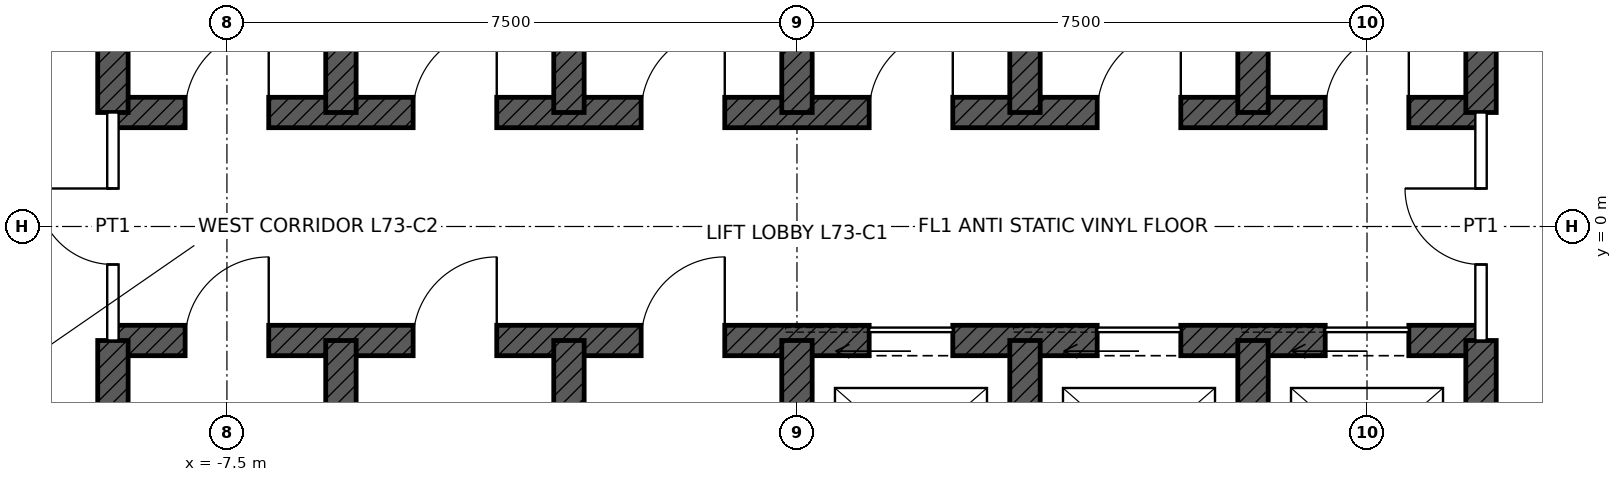
"""IFC4 building model, lengths in metres.
Left out: names, types, materials, properties, quantities, classifications, styles, units other than length and angle.
Written with IfcOpenShell. Run it as: python <this file> out.ifc"""

import sys

from ifc_helpers import new_model, si_unit, direction, frame, frame_2d, origin, place, context, subcontext, project, spatial, rectangle, extrude, element, fill, save


model = new_model("IFC4")
c1 = context("Model", 3, precision=1e-05, world=origin(), true_north=direction((0.0, 1.0)))
c2 = subcontext(c1, "Body", "Model", "MODEL_VIEW")
j1 = project(units=[si_unit("LENGTHUNIT", "METRE"), si_unit("PLANEANGLEUNIT", "RADIAN")], contexts=[c1])
p1 = place(None, origin())
s1 = spatial("IfcSite", under=j1, at=p1, CompositionType="ELEMENT")
p2 = place(p1, origin())
s2 = spatial("IfcBuilding", under=s1, at=p2, CompositionType="ELEMENT")
p3 = place(p2, frame((0.0, 0.0, 327.9)))
s3 = spatial("IfcBuildingStorey", under=s2, at=p3, CompositionType="ELEMENT", Elevation=327.9)
p4 = place(p3, frame((-9.0, 1.5, 0.0), z_axis=(0.0, 0.0, 1.0), x_axis=(1.0, 0.0, 0.0)))
e1 = element("IfcWall", 1, at=p4, inside=s3, PredefinedType="SHEAR", context=c2, shape_type="SweptSolid", body=[
    extrude(rectangle(XDim=18.0, YDim=0.4, at=frame_2d((9.0, 0.0))), origin(), (0.0, 0.0, 1.0), 4.0),
])
p5 = place(p4, frame((0.95, 0.0, 0.0)))
e2 = element("IfcOpeningElement", 2, at=p5, cuts=e1, PredefinedType="OPENING", context=c2, shape_type="SweptSolid", body=[
    extrude(rectangle(XDim=1.1, YDim=2.1, at=frame_2d((0.55, 1.05))), frame((0.0, 0.21, 0.0), z_axis=(0.0, -1.0, 0.0), x_axis=(1.0, 0.0, 0.0)), (0.0, 0.0, 1.0), 0.42),
])
p6 = place(p4, frame((3.95, 0.0, 0.0)))
e3 = element("IfcOpeningElement", 3, at=p6, cuts=e1, PredefinedType="OPENING", context=c2, shape_type="SweptSolid", body=[
    extrude(rectangle(XDim=1.1, YDim=2.1, at=frame_2d((0.55, 1.05))), frame((0.0, 0.21, 0.0), z_axis=(0.0, -1.0, 0.0), x_axis=(1.0, 0.0, 0.0)), (0.0, 0.0, 1.0), 0.42),
])
p7 = place(p4, frame((6.95, 0.0, 0.0)))
e4 = element("IfcOpeningElement", 4, at=p7, cuts=e1, PredefinedType="OPENING", context=c2, shape_type="SweptSolid", body=[
    extrude(rectangle(XDim=1.1, YDim=2.1, at=frame_2d((0.55, 1.05))), frame((0.0, 0.21, 0.0), z_axis=(0.0, -1.0, 0.0), x_axis=(1.0, 0.0, 0.0)), (0.0, 0.0, 1.0), 0.42),
])
p8 = place(p4, frame((9.95, 0.0, 0.0)))
e5 = element("IfcOpeningElement", 5, at=p8, cuts=e1, PredefinedType="OPENING", context=c2, shape_type="SweptSolid", body=[
    extrude(rectangle(XDim=1.1, YDim=2.1, at=frame_2d((0.55, 1.05))), frame((0.0, 0.21, 0.0), z_axis=(0.0, -1.0, 0.0), x_axis=(1.0, 0.0, 0.0)), (0.0, 0.0, 1.0), 0.42),
])
p9 = place(p4, frame((12.95, 0.0, 0.0)))
e6 = element("IfcOpeningElement", 6, at=p9, cuts=e1, PredefinedType="OPENING", context=c2, shape_type="SweptSolid", body=[
    extrude(rectangle(XDim=1.1, YDim=2.1, at=frame_2d((0.55, 1.05))), frame((0.0, 0.21, 0.0), z_axis=(0.0, -1.0, 0.0), x_axis=(1.0, 0.0, 0.0)), (0.0, 0.0, 1.0), 0.42),
])
p10 = place(p4, frame((15.95, 0.0, 0.0)))
e7 = element("IfcOpeningElement", 7, at=p10, cuts=e1, PredefinedType="OPENING", context=c2, shape_type="SweptSolid", body=[
    extrude(rectangle(XDim=1.1, YDim=2.1, at=frame_2d((0.55, 1.05))), frame((0.0, 0.21, 0.0), z_axis=(0.0, -1.0, 0.0), x_axis=(1.0, 0.0, 0.0)), (0.0, 0.0, 1.0), 0.42),
])
p11 = place(p3, frame((-9.0, -1.5, 0.0), z_axis=(0.0, 0.0, 1.0), x_axis=(1.0, 0.0, 0.0)))
e8 = element("IfcWall", 8, at=p11, inside=s3, PredefinedType="SHEAR", context=c2, shape_type="SweptSolid", body=[
    extrude(rectangle(XDim=18.0, YDim=0.4, at=frame_2d((9.0, 0.0))), origin(), (0.0, 0.0, 1.0), 4.0),
])
p12 = place(p11, frame((9.95, 0.0, 0.0)))
e9 = element("IfcOpeningElement", 9, at=p12, cuts=e8, PredefinedType="OPENING", context=c2, shape_type="SweptSolid", body=[
    extrude(rectangle(XDim=1.1, YDim=2.1, at=frame_2d((0.55, 1.05))), frame((0.0, 0.21, 0.0), z_axis=(0.0, -1.0, 0.0), x_axis=(1.0, 0.0, 0.0)), (0.0, 0.0, 1.0), 0.42),
])
p13 = place(p11, frame((12.95, 0.0, 0.0)))
e10 = element("IfcOpeningElement", 10, at=p13, cuts=e8, PredefinedType="OPENING", context=c2, shape_type="SweptSolid", body=[
    extrude(rectangle(XDim=1.1, YDim=2.1, at=frame_2d((0.55, 1.05))), frame((0.0, 0.21, 0.0), z_axis=(0.0, -1.0, 0.0), x_axis=(1.0, 0.0, 0.0)), (0.0, 0.0, 1.0), 0.42),
])
p14 = place(p11, frame((15.95, 0.0, 0.0)))
e11 = element("IfcOpeningElement", 11, at=p14, cuts=e8, PredefinedType="OPENING", context=c2, shape_type="SweptSolid", body=[
    extrude(rectangle(XDim=1.1, YDim=2.1, at=frame_2d((0.55, 1.05))), frame((0.0, 0.21, 0.0), z_axis=(0.0, -1.0, 0.0), x_axis=(1.0, 0.0, 0.0)), (0.0, 0.0, 1.0), 0.42),
])
p15 = place(p11, frame((0.95, 0.0, 0.0)))
e12 = element("IfcOpeningElement", 12, at=p15, cuts=e8, PredefinedType="OPENING", context=c2, shape_type="SweptSolid", body=[
    extrude(rectangle(XDim=1.1, YDim=2.1, at=frame_2d((0.55, 1.05))), frame((0.0, 0.21, 0.0), z_axis=(0.0, -1.0, 0.0), x_axis=(1.0, 0.0, 0.0)), (0.0, 0.0, 1.0), 0.42),
])
p16 = place(p11, frame((3.95, 0.0, 0.0)))
e13 = element("IfcOpeningElement", 13, at=p16, cuts=e8, PredefinedType="OPENING", context=c2, shape_type="SweptSolid", body=[
    extrude(rectangle(XDim=1.1, YDim=2.1, at=frame_2d((0.55, 1.05))), frame((0.0, 0.21, 0.0), z_axis=(0.0, -1.0, 0.0), x_axis=(1.0, 0.0, 0.0)), (0.0, 0.0, 1.0), 0.42),
])
p17 = place(p11, frame((6.95, 0.0, 0.0)))
e14 = element("IfcOpeningElement", 14, at=p17, cuts=e8, PredefinedType="OPENING", context=c2, shape_type="SweptSolid", body=[
    extrude(rectangle(XDim=1.1, YDim=2.1, at=frame_2d((0.55, 1.05))), frame((0.0, 0.21, 0.0), z_axis=(0.0, -1.0, 0.0), x_axis=(1.0, 0.0, 0.0)), (0.0, 0.0, 1.0), 0.42),
])
for number, where, z_axis, x_axis in (
    (15, (-9.0, 1.5, 0.0), (0.0, 0.0, 1.0), (0.0, 1.0, 0.0)),
    (16, (9.0, 1.5, 0.0), (0.0, 0.0, 1.0), (0.0, 1.0, 0.0)),
    (17, (-9.0, -4.5, 0.0), (0.0, 0.0, 1.0), (0.0, 1.0, 0.0)),
    (18, (9.0, -4.5, 0.0), (0.0, 0.0, 1.0), (0.0, 1.0, 0.0)),
    (19, (-6.0, 1.5, 0.0), (0.0, 0.0, 1.0), (0.0, 1.0, 0.0)),
    (20, (-3.0, 1.5, 0.0), (0.0, 0.0, 1.0), (0.0, 1.0, 0.0)),
    (21, (0.0, 1.5, 0.0), (0.0, 0.0, 1.0), (0.0, 1.0, 0.0)),
    (22, (3.0, 1.5, 0.0), (0.0, 0.0, 1.0), (0.0, 1.0, 0.0)),
    (23, (6.0, 1.5, 0.0), (0.0, 0.0, 1.0), (0.0, 1.0, 0.0)),
    (24, (-6.0, -4.5, 0.0), (0.0, 0.0, 1.0), (0.0, 1.0, 0.0)),
    (25, (-3.0, -4.5, 0.0), (0.0, 0.0, 1.0), (0.0, 1.0, 0.0)),
    (26, (0.0, -4.5, 0.0), (0.0, 0.0, 1.0), (0.0, 1.0, 0.0)),
    (27, (3.0, -4.5, 0.0), (0.0, 0.0, 1.0), (0.0, 1.0, 0.0)),
    (28, (6.0, -4.5, 0.0), (0.0, 0.0, 1.0), (0.0, 1.0, 0.0)),
):
    element("IfcWall", number, at=place(p3, frame(where, z_axis=z_axis, x_axis=x_axis)), inside=s3, PredefinedType="SHEAR", context=c2, shape_type="SweptSolid", body=[
        extrude(rectangle(XDim=3.0, YDim=0.4, at=frame_2d((1.5, 0.0))), origin(), (0.0, 0.0, 1.0), 4.0),
    ])
p18 = place(p3, frame((-9.0, -1.5, 0.0), z_axis=(0.0, 0.0, 1.0), x_axis=(0.0, 1.0, 0.0)))
e29 = element("IfcWall", 29, at=p18, inside=s3, PredefinedType="PARTITIONING", context=c2, shape_type="SweptSolid", body=[
    extrude(rectangle(XDim=3.0, YDim=0.15, at=frame_2d((1.5, 0.0))), origin(), (0.0, 0.0, 1.0), 3.75),
])
p19 = place(p18, frame((1.0, 0.0, 0.0)))
e30 = element("IfcOpeningElement", 30, at=p19, cuts=e29, PredefinedType="OPENING", context=c2, shape_type="SweptSolid", body=[
    extrude(rectangle(XDim=1.0, YDim=2.4, at=frame_2d((0.5, 1.2))), frame((0.0, 0.085, 0.0), z_axis=(0.0, -1.0, 0.0), x_axis=(1.0, 0.0, 0.0)), (0.0, 0.0, 1.0), 0.17),
])
p20 = place(p3, frame((9.0, -1.5, 0.0), z_axis=(0.0, 0.0, 1.0), x_axis=(0.0, 1.0, 0.0)))
e31 = element("IfcWall", 31, at=p20, inside=s3, PredefinedType="PARTITIONING", context=c2, shape_type="SweptSolid", body=[
    extrude(rectangle(XDim=3.0, YDim=0.15, at=frame_2d((1.5, 0.0))), origin(), (0.0, 0.0, 1.0), 3.75),
])
p21 = place(p20, frame((1.0, 0.0, 0.0)))
e32 = element("IfcOpeningElement", 32, at=p21, cuts=e31, PredefinedType="OPENING", context=c2, shape_type="SweptSolid", body=[
    extrude(rectangle(XDim=1.0, YDim=2.4, at=frame_2d((0.5, 1.2))), frame((0.0, 0.085, 0.0), z_axis=(0.0, -1.0, 0.0), x_axis=(1.0, 0.0, 0.0)), (0.0, 0.0, 1.0), 0.17),
])
p22 = place(p12, origin())
e33 = element("IfcDoor", 33, at=p22, inside=s3, OperationType="SLIDING_TO_LEFT", PredefinedType="DOOR", context=c2, shape_type="SweptSolid", body=[
    extrude(rectangle(XDim=1.1, YDim=2.1, at=frame_2d((0.55, 1.05))), frame((0.0, 0.025, 0.0), z_axis=(0.0, -1.0, 0.0), x_axis=(1.0, 0.0, 0.0)), (0.0, 0.0, 1.0), 0.05),
])
fill(e9, e33)
p23 = place(p13, origin())
e34 = element("IfcDoor", 34, at=p23, inside=s3, OperationType="SLIDING_TO_LEFT", PredefinedType="DOOR", context=c2, shape_type="SweptSolid", body=[
    extrude(rectangle(XDim=1.1, YDim=2.1, at=frame_2d((0.55, 1.05))), frame((0.0, 0.025, 0.0), z_axis=(0.0, -1.0, 0.0), x_axis=(1.0, 0.0, 0.0)), (0.0, 0.0, 1.0), 0.05),
])
fill(e10, e34)
p24 = place(p14, origin())
e35 = element("IfcDoor", 35, at=p24, inside=s3, OperationType="SLIDING_TO_LEFT", PredefinedType="DOOR", context=c2, shape_type="SweptSolid", body=[
    extrude(rectangle(XDim=1.1, YDim=2.1, at=frame_2d((0.55, 1.05))), frame((0.0, 0.025, 0.0), z_axis=(0.0, -1.0, 0.0), x_axis=(1.0, 0.0, 0.0)), (0.0, 0.0, 1.0), 0.05),
])
fill(e11, e35)
p25 = place(p19, origin())
e36 = element("IfcDoor", 36, at=p25, inside=s3, OperationType="SINGLE_SWING_RIGHT", PredefinedType="DOOR", context=c2, shape_type="SweptSolid", body=[
    extrude(rectangle(XDim=1.0, YDim=2.4, at=frame_2d((0.5, 1.2))), frame((0.0, 0.025, 0.0), z_axis=(0.0, -1.0, 0.0), x_axis=(1.0, 0.0, 0.0)), (0.0, 0.0, 1.0), 0.05),
])
fill(e30, e36)
p26 = place(p21, origin())
e37 = element("IfcDoor", 37, at=p26, inside=s3, OperationType="SINGLE_SWING_RIGHT", PredefinedType="DOOR", context=c2, shape_type="SweptSolid", body=[
    extrude(rectangle(XDim=1.0, YDim=2.4, at=frame_2d((0.5, 1.2))), frame((0.0, 0.025, 0.0), z_axis=(0.0, -1.0, 0.0), x_axis=(1.0, 0.0, 0.0)), (0.0, 0.0, 1.0), 0.05),
])
fill(e32, e37)
p27 = place(p5, origin())
e38 = element("IfcDoor", 38, at=p27, inside=s3, OperationType="SINGLE_SWING_RIGHT", PredefinedType="DOOR", context=c2, shape_type="SweptSolid", body=[
    extrude(rectangle(XDim=1.1, YDim=2.1, at=frame_2d((0.55, 1.05))), frame((0.0, 0.025, 0.0), z_axis=(0.0, -1.0, 0.0), x_axis=(1.0, 0.0, 0.0)), (0.0, 0.0, 1.0), 0.05),
])
fill(e2, e38)
p28 = place(p6, origin())
e39 = element("IfcDoor", 39, at=p28, inside=s3, OperationType="SINGLE_SWING_RIGHT", PredefinedType="DOOR", context=c2, shape_type="SweptSolid", body=[
    extrude(rectangle(XDim=1.1, YDim=2.1, at=frame_2d((0.55, 1.05))), frame((0.0, 0.025, 0.0), z_axis=(0.0, -1.0, 0.0), x_axis=(1.0, 0.0, 0.0)), (0.0, 0.0, 1.0), 0.05),
])
fill(e3, e39)
p29 = place(p7, origin())
e40 = element("IfcDoor", 40, at=p29, inside=s3, OperationType="SINGLE_SWING_RIGHT", PredefinedType="DOOR", context=c2, shape_type="SweptSolid", body=[
    extrude(rectangle(XDim=1.1, YDim=2.1, at=frame_2d((0.55, 1.05))), frame((0.0, 0.025, 0.0), z_axis=(0.0, -1.0, 0.0), x_axis=(1.0, 0.0, 0.0)), (0.0, 0.0, 1.0), 0.05),
])
fill(e4, e40)
p30 = place(p8, origin())
e41 = element("IfcDoor", 41, at=p30, inside=s3, OperationType="SINGLE_SWING_RIGHT", PredefinedType="DOOR", context=c2, shape_type="SweptSolid", body=[
    extrude(rectangle(XDim=1.1, YDim=2.1, at=frame_2d((0.55, 1.05))), frame((0.0, 0.025, 0.0), z_axis=(0.0, -1.0, 0.0), x_axis=(1.0, 0.0, 0.0)), (0.0, 0.0, 1.0), 0.05),
])
fill(e5, e41)
p31 = place(p9, origin())
e42 = element("IfcDoor", 42, at=p31, inside=s3, OperationType="SINGLE_SWING_RIGHT", PredefinedType="DOOR", context=c2, shape_type="SweptSolid", body=[
    extrude(rectangle(XDim=1.1, YDim=2.1, at=frame_2d((0.55, 1.05))), frame((0.0, 0.025, 0.0), z_axis=(0.0, -1.0, 0.0), x_axis=(1.0, 0.0, 0.0)), (0.0, 0.0, 1.0), 0.05),
])
fill(e6, e42)
p32 = place(p10, origin())
e43 = element("IfcDoor", 43, at=p32, inside=s3, OperationType="SINGLE_SWING_RIGHT", PredefinedType="DOOR", context=c2, shape_type="SweptSolid", body=[
    extrude(rectangle(XDim=1.1, YDim=2.1, at=frame_2d((0.55, 1.05))), frame((0.0, 0.025, 0.0), z_axis=(0.0, -1.0, 0.0), x_axis=(1.0, 0.0, 0.0)), (0.0, 0.0, 1.0), 0.05),
])
fill(e7, e43)
p33 = place(p15, origin())
e44 = element("IfcDoor", 44, at=p33, inside=s3, OperationType="SINGLE_SWING_RIGHT", PredefinedType="DOOR", context=c2, shape_type="SweptSolid", body=[
    extrude(rectangle(XDim=1.1, YDim=2.1, at=frame_2d((0.55, 1.05))), frame((0.0, 0.025, 0.0), z_axis=(0.0, -1.0, 0.0), x_axis=(1.0, 0.0, 0.0)), (0.0, 0.0, 1.0), 0.05),
])
fill(e12, e44)
p34 = place(p16, origin())
e45 = element("IfcDoor", 45, at=p34, inside=s3, OperationType="SINGLE_SWING_RIGHT", PredefinedType="DOOR", context=c2, shape_type="SweptSolid", body=[
    extrude(rectangle(XDim=1.1, YDim=2.1, at=frame_2d((0.55, 1.05))), frame((0.0, 0.025, 0.0), z_axis=(0.0, -1.0, 0.0), x_axis=(1.0, 0.0, 0.0)), (0.0, 0.0, 1.0), 0.05),
])
fill(e13, e45)
p35 = place(p17, origin())
e46 = element("IfcDoor", 46, at=p35, inside=s3, OperationType="SINGLE_SWING_RIGHT", PredefinedType="DOOR", context=c2, shape_type="SweptSolid", body=[
    extrude(rectangle(XDim=1.1, YDim=2.1, at=frame_2d((0.55, 1.05))), frame((0.0, 0.025, 0.0), z_axis=(0.0, -1.0, 0.0), x_axis=(1.0, 0.0, 0.0)), (0.0, 0.0, 1.0), 0.05),
])
fill(e14, e46)
save(model, sys.argv[1])
